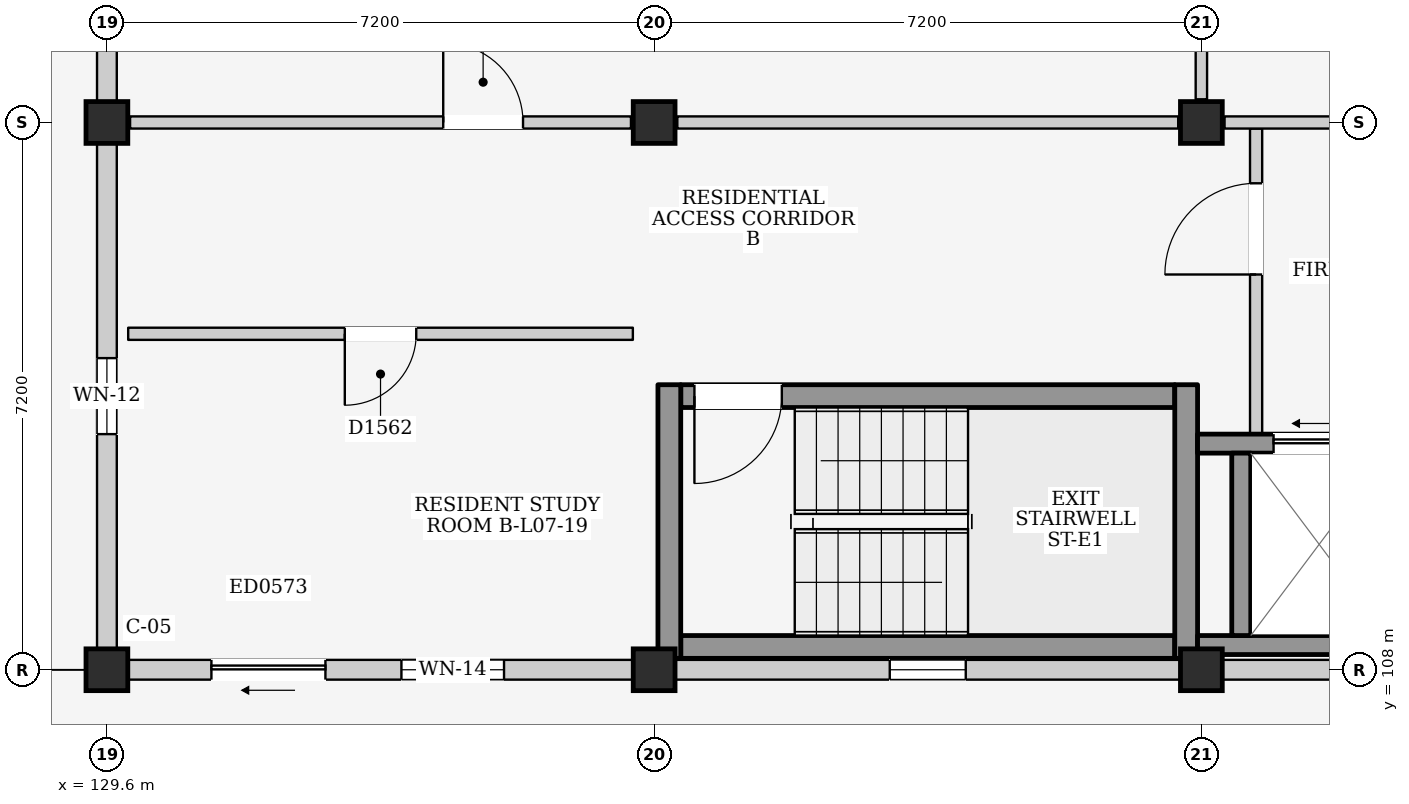
"""IFC4 building model, lengths in metres.
Left out: names, types, materials, properties, quantities, classifications, styles, units other than length and angle.
Written with IfcOpenShell. Run it as: python <this file> out.ifc"""

import sys

from ifc_helpers import new_model, si_unit, direction, frame, frame_2d, origin, origin_2d, place, context, subcontext, project, spatial, rectangle, extrude, element, fill, save


model = new_model("IFC4")
c1 = context("Model", 3, precision=1e-05, world=origin(), true_north=direction((0.0, 1.0)))
c2 = subcontext(c1, "Body", "Model", "MODEL_VIEW")
j1 = project(units=[si_unit("LENGTHUNIT", "METRE"), si_unit("PLANEANGLEUNIT", "RADIAN")], contexts=[c1])
p1 = place(None, origin())
s1 = spatial("IfcSite", under=j1, at=p1, CompositionType="ELEMENT")
p2 = place(p1, origin())
s2 = spatial("IfcBuilding", under=s1, at=p2, CompositionType="ELEMENT")
p3 = place(p2, frame((0.0, 0.0, 25.1)))
s3 = spatial("IfcBuildingStorey", under=s2, at=p3, CompositionType="ELEMENT", Elevation=25.1)
for number, where, z_axis, x_axis in (
    (1, (129.6, 108.0, 0.0), (0.0, 0.0, 1.0), (1.0, 0.0, 0.0)),
    (2, (129.6, 115.2, 0.0), (0.0, 0.0, 1.0), (1.0, 0.0, 0.0)),
    (3, (136.8, 108.0, 0.0), (0.0, 0.0, 1.0), (1.0, 0.0, 0.0)),
    (4, (136.8, 115.2, 0.0), (0.0, 0.0, 1.0), (1.0, 0.0, 0.0)),
    (5, (144.0, 108.0, 0.0), (0.0, 0.0, 1.0), (1.0, 0.0, 0.0)),
    (6, (144.0, 115.2, 0.0), (0.0, 0.0, 1.0), (1.0, 0.0, 0.0)),
):
    element("IfcColumn", number, at=place(p3, frame(where, z_axis=z_axis, x_axis=x_axis)), inside=s3, PredefinedType="COLUMN", context=c2, shape_type="SweptSolid", body=[
        extrude(rectangle(XDim=0.55, YDim=0.55, at=origin_2d()), origin(), (0.0, 0.0, 1.0), 3.2),
    ])
p4 = place(p3, frame((129.875, 108.0, 0.0), z_axis=(0.0, 0.0, 1.0), x_axis=(1.0, 0.0, 0.0)))
e7 = element("IfcWall", 7, at=p4, inside=s3, PredefinedType="ELEMENTEDWALL", context=c2, shape_type="SweptSolid", body=[
    extrude(rectangle(XDim=6.65, YDim=0.26, at=frame_2d((3.325, 0.0))), origin(), (0.0, 0.0, 1.0), 2.375),
])
p5 = place(p4, frame((1.1, 0.0, 0.0)))
e8 = element("IfcOpeningElement", 8, at=p5, cuts=e7, PredefinedType="OPENING", context=c2, shape_type="SweptSolid", body=[
    extrude(rectangle(XDim=1.5, YDim=2.12, at=frame_2d((0.75, 1.06))), frame((0.0, 0.145, 0.0), z_axis=(0.0, -1.0, 0.0), x_axis=(1.0, 0.0, 0.0)), (0.0, 0.0, 1.0), 0.29),
])
p6 = place(p4, frame((3.6, 0.0, 0.765)))
e9 = element("IfcOpeningElement", 9, at=p6, cuts=e7, PredefinedType="OPENING", context=c2, shape_type="SweptSolid", body=[
    extrude(rectangle(XDim=1.35, YDim=1.5, at=frame_2d((0.675, 0.75))), frame((0.0, 0.145, 0.0), z_axis=(0.0, -1.0, 0.0), x_axis=(1.0, 0.0, 0.0)), (0.0, 0.0, 1.0), 0.29),
])
p7 = place(p3, frame((129.6, 108.275, 0.0), z_axis=(0.0, 0.0, 1.0), x_axis=(0.0, 1.0, 0.0)))
e10 = element("IfcWall", 10, at=p7, inside=s3, PredefinedType="ELEMENTEDWALL", context=c2, shape_type="SweptSolid", body=[
    extrude(rectangle(XDim=6.65, YDim=0.26, at=frame_2d((3.325, 0.0))), origin(), (0.0, 0.0, 1.0), 2.475),
])
p8 = place(p7, frame((2.825, 0.0, 1.1)))
e11 = element("IfcOpeningElement", 11, at=p8, cuts=e10, PredefinedType="OPENING", context=c2, shape_type="SweptSolid", body=[
    extrude(rectangle(XDim=1.0, YDim=0.9, at=frame_2d((0.5, 0.45))), frame((0.0, 0.145, 0.0), z_axis=(0.0, -1.0, 0.0), x_axis=(1.0, 0.0, 0.0)), (0.0, 0.0, 1.0), 0.29),
])
p9 = place(p3, frame((129.6, 115.475, 0.0), z_axis=(0.0, 0.0, 1.0), x_axis=(0.0, 1.0, 0.0)))
e12 = element("IfcWall", 12, at=p9, inside=s3, PredefinedType="ELEMENTEDWALL", context=c2, shape_type="SweptSolid", body=[
    extrude(rectangle(XDim=6.65, YDim=0.26, at=frame_2d((3.325, 0.0))), origin(), (0.0, 0.0, 1.0), 2.475),
])
p10 = place(p9, frame((3.65, 0.0, 0.0)))
e13 = element("IfcOpeningElement", 13, at=p10, cuts=e12, PredefinedType="OPENING", context=c2, shape_type="SweptSolid", body=[
    extrude(rectangle(XDim=1.4, YDim=2.1, at=frame_2d((0.7, 1.05))), frame((0.0, 0.145, 0.0), z_axis=(0.0, -1.0, 0.0), x_axis=(1.0, 0.0, 0.0)), (0.0, 0.0, 1.0), 0.29),
])
p11 = place(p9, frame((0.85, 0.0, 0.95)))
e14 = element("IfcOpeningElement", 14, at=p11, cuts=e12, PredefinedType="OPENING", context=c2, shape_type="SweptSolid", body=[
    extrude(rectangle(XDim=1.2, YDim=1.35, at=frame_2d((0.6, 0.675))), frame((0.0, 0.145, 0.0), z_axis=(0.0, -1.0, 0.0), x_axis=(1.0, 0.0, 0.0)), (0.0, 0.0, 1.0), 0.29),
])
p12 = place(p3, frame((137.075, 108.0, 0.0), z_axis=(0.0, 0.0, 1.0), x_axis=(1.0, 0.0, 0.0)))
e15 = element("IfcWall", 15, at=p12, inside=s3, PredefinedType="ELEMENTEDWALL", context=c2, shape_type="SweptSolid", body=[
    extrude(rectangle(XDim=6.65, YDim=0.26, at=frame_2d((3.325, 0.0))), origin(), (0.0, 0.0, 1.0), 2.375),
])
p13 = place(p12, frame((2.825, 0.0, 1.2)))
e16 = element("IfcOpeningElement", 16, at=p13, cuts=e15, PredefinedType="OPENING", context=c2, shape_type="SweptSolid", body=[
    extrude(rectangle(XDim=1.0, YDim=0.9, at=frame_2d((0.5, 0.45))), frame((0.0, 0.145, 0.0), z_axis=(0.0, -1.0, 0.0), x_axis=(1.0, 0.0, 0.0)), (0.0, 0.0, 1.0), 0.29),
])
p14 = place(p3, frame((144.275, 108.0, 0.0), z_axis=(0.0, 0.0, 1.0), x_axis=(1.0, 0.0, 0.0)))
e17 = element("IfcWall", 17, at=p14, inside=s3, PredefinedType="ELEMENTEDWALL", context=c2, shape_type="SweptSolid", body=[
    extrude(rectangle(XDim=6.65, YDim=0.26, at=frame_2d((3.325, 0.0))), origin(), (0.0, 0.0, 1.0), 2.375),
])
p15 = place(p14, frame((2.825, 0.0, 1.2)))
e18 = element("IfcOpeningElement", 18, at=p15, cuts=e17, PredefinedType="OPENING", context=c2, shape_type="SweptSolid", body=[
    extrude(rectangle(XDim=1.0, YDim=0.9, at=frame_2d((0.5, 0.45))), frame((0.0, 0.145, 0.0), z_axis=(0.0, -1.0, 0.0), x_axis=(1.0, 0.0, 0.0)), (0.0, 0.0, 1.0), 0.29),
])
p16 = place(p3, frame((137.15, 108.3, 0.0), z_axis=(0.0, 0.0, 1.0), x_axis=(1.0, 0.0, 0.0)))
e19 = element("IfcWall", 19, at=p16, inside=s3, PredefinedType="SHEAR", context=c2, shape_type="SweptSolid", body=[
    extrude(rectangle(XDim=6.5, YDim=0.3, at=frame_2d((3.25, 0.0))), origin(), (0.0, 0.0, 1.0), 2.99),
])
p17 = place(p3, frame((137.15, 111.6, 0.0), z_axis=(0.0, 0.0, 1.0), x_axis=(1.0, 0.0, 0.0)))
e20 = element("IfcWall", 20, at=p17, inside=s3, PredefinedType="SHEAR", context=c2, shape_type="SweptSolid", body=[
    extrude(rectangle(XDim=6.5, YDim=0.3, at=frame_2d((3.25, 0.0))), origin(), (0.0, 0.0, 1.0), 2.99),
])
p18 = place(p17, frame((0.18, 0.0, 0.0)))
e21 = element("IfcOpeningElement", 21, at=p18, cuts=e20, PredefinedType="OPENING", context=c2, shape_type="SweptSolid", body=[
    extrude(rectangle(XDim=1.15, YDim=2.2, at=frame_2d((0.575, 1.1))), frame((0.0, 0.165, 0.0), z_axis=(0.0, -1.0, 0.0), x_axis=(1.0, 0.0, 0.0)), (0.0, 0.0, 1.0), 0.33),
])
for number, where, z_axis, x_axis in (
    (22, (137.0, 108.15, 0.0), (0.0, 0.0, 1.0), (0.0, 1.0, 0.0)),
    (23, (143.8, 108.15, 0.0), (0.0, 0.0, 1.0), (0.0, 1.0, 0.0)),
):
    element("IfcWall", number, at=place(p3, frame(where, z_axis=z_axis, x_axis=x_axis)), inside=s3, PredefinedType="SHEAR", context=c2, shape_type="SweptSolid", body=[
        extrude(rectangle(XDim=3.6, YDim=0.3, at=frame_2d((1.8, 0.0))), origin(), (0.0, 0.0, 1.0), 2.99),
    ])
p19 = place(p3, frame((144.72, 111.1, 0.0), z_axis=(0.0, 0.0, 1.0), x_axis=(0.0, 1.0, 0.0)))
e24 = element("IfcWall", 24, at=p19, inside=s3, PredefinedType="PARTITIONING", context=c2, shape_type="SweptSolid", body=[
    extrude(rectangle(XDim=4.02, YDim=0.16, at=frame_2d((2.01, 0.0))), origin(), (0.0, 0.0, 1.0), 2.99),
])
p20 = place(p19, frame((2.1, 0.0, 0.0)))
e25 = element("IfcOpeningElement", 25, at=p20, cuts=e24, PredefinedType="OPENING", context=c2, shape_type="SweptSolid", body=[
    extrude(rectangle(XDim=1.2, YDim=2.2, at=frame_2d((0.6, 1.1))), frame((0.0, 0.095, 0.0), z_axis=(0.0, -1.0, 0.0), x_axis=(1.0, 0.0, 0.0)), (0.0, 0.0, 1.0), 0.19),
])
p21 = place(p3, frame((143.95, 108.325, 0.0), z_axis=(0.0, 0.0, 1.0), x_axis=(1.0, 0.0, 0.0)))
e26 = element("IfcWall", 26, at=p21, inside=s3, PredefinedType="SHEAR", context=c2, shape_type="SweptSolid", body=[
    extrude(rectangle(XDim=2.675, YDim=0.25, at=frame_2d((1.337, 0.0))), origin(), (0.0, 0.0, 1.0), 2.99),
])
p22 = place(p3, frame((143.95, 110.975, 0.0), z_axis=(0.0, 0.0, 1.0), x_axis=(1.0, 0.0, 0.0)))
e27 = element("IfcWall", 27, at=p22, inside=s3, PredefinedType="SHEAR", context=c2, shape_type="SweptSolid", body=[
    extrude(rectangle(XDim=2.675, YDim=0.25, at=frame_2d((1.337, 0.0))), origin(), (0.0, 0.0, 1.0), 2.99),
])
p23 = place(p22, frame((1.0, 0.0, 0.0)))
e28 = element("IfcOpeningElement", 28, at=p23, cuts=e27, PredefinedType="OPENING", context=c2, shape_type="SweptSolid", body=[
    extrude(rectangle(XDim=1.2, YDim=2.25, at=frame_2d((0.6, 1.125))), frame((0.0, 0.14, 0.0), z_axis=(0.0, -1.0, 0.0), x_axis=(1.0, 0.0, 0.0)), (0.0, 0.0, 1.0), 0.28),
])
p24 = place(p3, frame((144.525, 108.45, 0.0), z_axis=(0.0, 0.0, 1.0), x_axis=(0.0, 1.0, 0.0)))
e29 = element("IfcWall", 29, at=p24, inside=s3, PredefinedType="SHEAR", context=c2, shape_type="SweptSolid", body=[
    extrude(rectangle(XDim=2.4, YDim=0.25, at=frame_2d((1.2, 0.0))), origin(), (0.0, 0.0, 1.0), 2.99),
])
p25 = place(p3, frame((129.905, 115.2, 0.0), z_axis=(0.0, 0.0, 1.0), x_axis=(1.0, 0.0, 0.0)))
e30 = element("IfcWall", 30, at=p25, inside=s3, PredefinedType="PARTITIONING", context=c2, shape_type="SweptSolid", body=[
    extrude(rectangle(XDim=6.59, YDim=0.16, at=frame_2d((3.295, 0.0))), origin(), (0.0, 0.0, 1.0), 2.375),
])
p26 = place(p25, frame((4.12, 0.0, 0.0)))
e31 = element("IfcOpeningElement", 31, at=p26, cuts=e30, PredefinedType="OPENING", context=c2, shape_type="SweptSolid", body=[
    extrude(rectangle(XDim=1.05, YDim=2.2, at=frame_2d((0.525, 1.1))), frame((0.0, 0.095, 0.0), z_axis=(0.0, -1.0, 0.0), x_axis=(1.0, 0.0, 0.0)), (0.0, 0.0, 1.0), 0.19),
])
p27 = place(p3, frame((137.105, 115.2, 0.0), z_axis=(0.0, 0.0, 1.0), x_axis=(1.0, 0.0, 0.0)))
e32 = element("IfcWall", 32, at=p27, inside=s3, PredefinedType="PARTITIONING", context=c2, shape_type="SweptSolid", body=[
    extrude(rectangle(XDim=6.59, YDim=0.16, at=frame_2d((3.295, 0.0))), origin(), (0.0, 0.0, 1.0), 2.375),
])
p28 = place(p3, frame((144.0, 115.505, 0.0), z_axis=(0.0, 0.0, 1.0), x_axis=(0.0, 1.0, 0.0)))
e33 = element("IfcWall", 33, at=p28, inside=s3, PredefinedType="PARTITIONING", context=c2, shape_type="SweptSolid", body=[
    extrude(rectangle(XDim=6.59, YDim=0.15, at=frame_2d((3.295, 0.0))), origin(), (0.0, 0.0, 1.0), 2.475),
])
p29 = place(p3, frame((144.305, 115.2, 0.0), z_axis=(0.0, 0.0, 1.0), x_axis=(1.0, 0.0, 0.0)))
e34 = element("IfcWall", 34, at=p29, inside=s3, PredefinedType="PARTITIONING", context=c2, shape_type="SweptSolid", body=[
    extrude(rectangle(XDim=6.59, YDim=0.16, at=frame_2d((3.295, 0.0))), origin(), (0.0, 0.0, 1.0), 2.375),
])
p30 = place(p29, frame((4.345, 0.0, 0.0)))
e35 = element("IfcOpeningElement", 35, at=p30, cuts=e34, PredefinedType="OPENING", context=c2, shape_type="SweptSolid", body=[
    extrude(rectangle(XDim=1.0, YDim=2.15, at=frame_2d((0.5, 1.075))), frame((0.0, 0.095, 0.0), z_axis=(0.0, -1.0, 0.0), x_axis=(1.0, 0.0, 0.0)), (0.0, 0.0, 1.0), 0.19),
])
p31 = place(p3, frame((129.88, 112.42, 0.0), z_axis=(0.0, 0.0, 1.0), x_axis=(1.0, 0.0, 0.0)))
e36 = element("IfcWall", 36, at=p31, inside=s3, PredefinedType="PARTITIONING", context=c2, shape_type="SweptSolid", body=[
    extrude(rectangle(XDim=6.64, YDim=0.16, at=frame_2d((3.32, 0.0))), origin(), (0.0, 0.0, 1.0), 2.99),
])
p32 = place(p31, frame((2.85, 0.0, 0.0)))
e37 = element("IfcOpeningElement", 37, at=p32, cuts=e36, PredefinedType="OPENING", context=c2, shape_type="SweptSolid", body=[
    extrude(rectangle(XDim=0.94, YDim=2.12, at=frame_2d((0.47, 1.06))), frame((0.0, 0.095, 0.0), z_axis=(0.0, -1.0, 0.0), x_axis=(1.0, 0.0, 0.0)), (0.0, 0.0, 1.0), 0.19),
])
p33 = place(p5, frame((1.5, 0.0, 0.0), z_axis=(0.0, 0.0, 1.0), x_axis=(-1.0, 0.0, 0.0)))
e38 = element("IfcDoor", 38, at=p33, inside=s3, OperationType="SLIDING_TO_LEFT", PredefinedType="DOOR", context=c2, shape_type="SweptSolid", body=[
    extrude(rectangle(XDim=1.5, YDim=2.12, at=frame_2d((0.75, 1.06))), frame((0.0, 0.025, 0.0), z_axis=(0.0, -1.0, 0.0), x_axis=(1.0, 0.0, 0.0)), (0.0, 0.0, 1.0), 0.05),
])
fill(e8, e38)
p34 = place(p6, origin())
e39 = element("IfcWindow", 39, at=p34, inside=s3, PartitioningType="SINGLE_PANEL", PredefinedType="WINDOW", context=c2, shape_type="SweptSolid", body=[
    extrude(rectangle(XDim=1.35, YDim=1.5, at=frame_2d((0.675, 0.75))), frame((0.0, 0.03, 0.0), z_axis=(0.0, -1.0, 0.0), x_axis=(1.0, 0.0, 0.0)), (0.0, 0.0, 1.0), 0.06),
])
fill(e9, e39)
p35 = place(p8, origin())
e40 = element("IfcWindow", 40, at=p35, inside=s3, PartitioningType="SINGLE_PANEL", PredefinedType="WINDOW", context=c2, shape_type="SweptSolid", body=[
    extrude(rectangle(XDim=1.0, YDim=0.9, at=frame_2d((0.5, 0.45))), frame((0.0, 0.03, 0.0), z_axis=(0.0, -1.0, 0.0), x_axis=(1.0, 0.0, 0.0)), (0.0, 0.0, 1.0), 0.06),
])
fill(e11, e40)
p36 = place(p13, origin())
e41 = element("IfcWindow", 41, at=p36, inside=s3, PartitioningType="SINGLE_PANEL", PredefinedType="WINDOW", context=c2, shape_type="SweptSolid", body=[
    extrude(rectangle(XDim=1.0, YDim=0.9, at=frame_2d((0.5, 0.45))), frame((0.0, 0.03, 0.0), z_axis=(0.0, -1.0, 0.0), x_axis=(1.0, 0.0, 0.0)), (0.0, 0.0, 1.0), 0.06),
])
fill(e16, e41)
p37 = place(p18, frame((1.15, 0.0, 0.0), z_axis=(0.0, 0.0, 1.0), x_axis=(-1.0, 0.0, 0.0)))
e42 = element("IfcDoor", 42, at=p37, inside=s3, OperationType="SINGLE_SWING_RIGHT", PredefinedType="DOOR", context=c2, shape_type="SweptSolid", body=[
    extrude(rectangle(XDim=1.15, YDim=2.2, at=frame_2d((0.575, 1.1))), frame((0.0, 0.025, 0.0), z_axis=(0.0, -1.0, 0.0), x_axis=(1.0, 0.0, 0.0)), (0.0, 0.0, 1.0), 0.05),
])
fill(e21, e42)
p38 = place(p20, origin())
e43 = element("IfcDoor", 43, at=p38, inside=s3, OperationType="SINGLE_SWING_LEFT", PredefinedType="DOOR", context=c2, shape_type="SweptSolid", body=[
    extrude(rectangle(XDim=1.2, YDim=2.2, at=frame_2d((0.6, 1.1))), frame((0.0, 0.025, 0.0), z_axis=(0.0, -1.0, 0.0), x_axis=(1.0, 0.0, 0.0)), (0.0, 0.0, 1.0), 0.05),
])
fill(e25, e43)
p39 = place(p23, origin())
e44 = element("IfcDoor", 44, at=p39, inside=s3, OperationType="SLIDING_TO_LEFT", PredefinedType="DOOR", context=c2, shape_type="SweptSolid", body=[
    extrude(rectangle(XDim=1.2, YDim=2.25, at=frame_2d((0.6, 1.125))), frame((0.0, 0.025, 0.0), z_axis=(0.0, -1.0, 0.0), x_axis=(1.0, 0.0, 0.0)), (0.0, 0.0, 1.0), 0.05),
])
fill(e28, e44)
p40 = place(p26, origin())
e45 = element("IfcDoor", 45, at=p40, inside=s3, OperationType="SINGLE_SWING_LEFT", PredefinedType="DOOR", context=c2, shape_type="SweptSolid", body=[
    extrude(rectangle(XDim=1.05, YDim=2.2, at=frame_2d((0.525, 1.1))), frame((0.0, 0.025, 0.0), z_axis=(0.0, -1.0, 0.0), x_axis=(1.0, 0.0, 0.0)), (0.0, 0.0, 1.0), 0.05),
])
fill(e31, e45)
p41 = place(p32, frame((0.94, 0.0, 0.0), z_axis=(0.0, 0.0, 1.0), x_axis=(-1.0, 0.0, 0.0)))
e46 = element("IfcDoor", 46, at=p41, inside=s3, OperationType="SINGLE_SWING_RIGHT", PredefinedType="DOOR", context=c2, shape_type="SweptSolid", body=[
    extrude(rectangle(XDim=0.94, YDim=2.12, at=frame_2d((0.47, 1.06))), frame((0.0, 0.025, 0.0), z_axis=(0.0, -1.0, 0.0), x_axis=(1.0, 0.0, 0.0)), (0.0, 0.0, 1.0), 0.05),
])
fill(e37, e46)
save(model, sys.argv[1])
